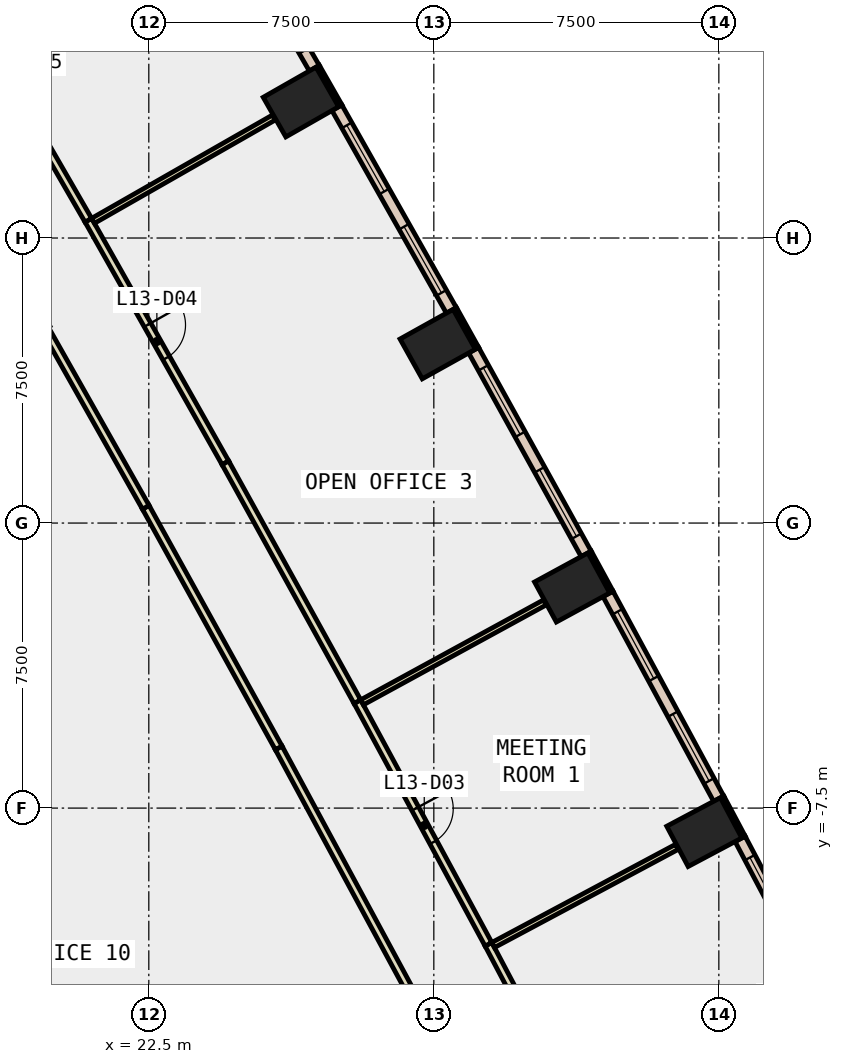
"""IFC4 building model, lengths in metres.
Left out: names, types, materials, properties, quantities, classifications, styles, units other than length and angle.
Written with IfcOpenShell. Run it as: python <this file> out.ifc"""

import sys

from ifc_helpers import new_model, si_unit, direction, frame, frame_2d, origin, origin_2d, place, context, subcontext, project, spatial, rectangle, extrude, element, fill, save


model = new_model("IFC4")
c1 = context("Model", 3, precision=1e-05, world=origin(), true_north=direction((0.0, 1.0)))
c2 = subcontext(c1, "Body", "Model", "MODEL_VIEW")
j1 = project(units=[si_unit("LENGTHUNIT", "METRE"), si_unit("PLANEANGLEUNIT", "RADIAN")], contexts=[c1])
p1 = place(None, origin())
s1 = spatial("IfcSite", under=j1, at=p1, CompositionType="ELEMENT")
p2 = place(p1, origin())
s2 = spatial("IfcBuilding", under=s1, at=p2, CompositionType="ELEMENT")
p3 = place(p2, frame((0.0, 0.0, 64.4)))
s3 = spatial("IfcBuildingStorey", under=s2, at=p3, CompositionType="ELEMENT", Elevation=64.4)
for number, where, z_axis, x_axis in (
    (1, (37.117, -8.132, -0.4), (0.0, 0.0, 1.0), (-0.469, 0.883, 0.0)),
    (2, (33.64, -1.695, -0.4), (0.0, 0.0, 1.0), (-0.478, 0.878, 0.0)),
    (3, (30.102, 4.708, -0.4), (0.0, 0.0, 1.0), (-0.487, 0.873, 0.0)),
    (4, (26.503, 11.078, -0.4), (0.0, 0.0, 1.0), (-0.496, 0.869, 0.0)),
):
    element("IfcColumn", number, at=place(p3, frame(where, z_axis=z_axis, x_axis=x_axis)), inside=s3, PredefinedType="COLUMN", context=c2, shape_type="SweptSolid", body=[
        extrude(rectangle(XDim=1.2, YDim=1.6, at=origin_2d()), origin(), (0.0, 0.0, 1.0), 4.2),
    ])
p4 = place(p3, frame((38.149, -8.263, 0.0), z_axis=(0.0, 0.0, 1.0), x_axis=(-0.469467784567, 0.882949601763, 0.0)))
e5 = element("IfcWall", 5, at=p4, inside=s3, PredefinedType="STANDARD", context=c2, shape_type="SweptSolid", body=[
    extrude(rectangle(XDim=1.199, YDim=0.1, at=frame_2d((0.6, 0.0))), origin(), (0.0, 0.0, 1.0), 3.8),
])
p5 = place(p3, frame((34.673, -1.816, 0.0), z_axis=(0.0, 0.0, 1.0), x_axis=(-0.478267644701, 0.878214131082, 0.0)))
e6 = element("IfcWall", 6, at=p5, inside=s3, PredefinedType="STANDARD", context=c2, shape_type="SweptSolid", body=[
    extrude(rectangle(XDim=1.2, YDim=0.1, at=frame_2d((0.6, 0.0))), origin(), (0.0, 0.0, 1.0), 3.8),
])
p6 = place(p3, frame((31.136, 4.598, 0.0), z_axis=(0.0, 0.0, 1.0), x_axis=(-0.486730996044, 0.87355190887, 0.0)))
e7 = element("IfcWall", 7, at=p6, inside=s3, PredefinedType="STANDARD", context=c2, shape_type="SweptSolid", body=[
    extrude(rectangle(XDim=1.2, YDim=0.1, at=frame_2d((0.6, 0.0))), origin(), (0.0, 0.0, 1.0), 3.8),
])
p7 = place(p3, frame((27.539, 10.978, 0.0), z_axis=(0.0, 0.0, 1.0), x_axis=(-0.495854054996, 0.868405870629, 0.0)))
e8 = element("IfcWall", 8, at=p7, inside=s3, PredefinedType="STANDARD", context=c2, shape_type="SweptSolid", body=[
    extrude(rectangle(XDim=1.2, YDim=0.1, at=frame_2d((0.6, 0.0))), origin(), (0.0, 0.0, 1.0), 3.8),
])
p8 = place(p3, frame((40.964, -13.81, 0.0), z_axis=(0.0, 0.0, 1.0), x_axis=(-0.467041710902, 0.884235285587, 0.0)))
e9 = element("IfcWall", 9, at=p8, inside=s3, PredefinedType="STANDARD", context=c2, shape_type="SweptSolid", body=[
    extrude(rectangle(XDim=6.22, YDim=0.3, at=frame_2d((3.11, 0.0))), origin(), (0.0, 0.0, 1.0), 3.8),
])
p9 = place(p8, frame((0.555, 0.0, 0.9)))
e10 = element("IfcOpeningElement", 10, at=p9, cuts=e9, PredefinedType="OPENING", context=c2, shape_type="SweptSolid", body=[
    extrude(rectangle(XDim=2.0, YDim=2.6, at=frame_2d((1.0, 1.3))), frame((0.0, 0.16, 0.0), z_axis=(0.0, -1.0, 0.0), x_axis=(1.0, 0.0, 0.0)), (0.0, 0.0, 1.0), 0.32),
])
p10 = place(p8, frame((3.665, 0.0, 0.9)))
e11 = element("IfcOpeningElement", 11, at=p10, cuts=e9, PredefinedType="OPENING", context=c2, shape_type="SweptSolid", body=[
    extrude(rectangle(XDim=2.0, YDim=2.6, at=frame_2d((1.0, 1.3))), frame((0.0, 0.16, 0.0), z_axis=(0.0, -1.0, 0.0), x_axis=(1.0, 0.0, 0.0)), (0.0, 0.0, 1.0), 0.32),
])
p11 = place(p3, frame((37.495, -7.253, 0.0), z_axis=(0.0, 0.0, 1.0), x_axis=(-0.475413659872, 0.879762383833, 0.0)))
e12 = element("IfcWall", 12, at=p11, inside=s3, PredefinedType="STANDARD", context=c2, shape_type="SweptSolid", body=[
    extrude(rectangle(XDim=6.125, YDim=0.3, at=frame_2d((3.063, 0.0))), origin(), (0.0, 0.0, 1.0), 3.8),
])
p12 = place(p11, frame((0.531, 0.0, 0.9)))
e13 = element("IfcOpeningElement", 13, at=p12, cuts=e12, PredefinedType="OPENING", context=c2, shape_type="SweptSolid", body=[
    extrude(rectangle(XDim=2.0, YDim=2.6, at=frame_2d((1.0, 1.3))), frame((0.0, 0.16, 0.0), z_axis=(0.0, -1.0, 0.0), x_axis=(1.0, 0.0, 0.0)), (0.0, 0.0, 1.0), 0.32),
])
p13 = place(p11, frame((3.594, 0.0, 0.9)))
e14 = element("IfcOpeningElement", 14, at=p13, cuts=e12, PredefinedType="OPENING", context=c2, shape_type="SweptSolid", body=[
    extrude(rectangle(XDim=2.0, YDim=2.6, at=frame_2d((1.0, 1.3))), frame((0.0, 0.16, 0.0), z_axis=(0.0, -1.0, 0.0), x_axis=(1.0, 0.0, 0.0)), (0.0, 0.0, 1.0), 0.32),
])
p14 = place(p3, frame((34.009, -0.812, 0.0), z_axis=(0.0, 0.0, 1.0), x_axis=(-0.483587271547, 0.875296150339, 0.0)))
e15 = element("IfcWall", 15, at=p14, inside=s3, PredefinedType="STANDARD", context=c2, shape_type="SweptSolid", body=[
    extrude(rectangle(XDim=6.125, YDim=0.3, at=frame_2d((3.062, 0.0))), origin(), (0.0, 0.0, 1.0), 3.8),
])
p15 = place(p14, frame((0.531, 0.0, 0.9)))
e16 = element("IfcOpeningElement", 16, at=p15, cuts=e15, PredefinedType="OPENING", context=c2, shape_type="SweptSolid", body=[
    extrude(rectangle(XDim=2.0, YDim=2.6, at=frame_2d((1.0, 1.3))), frame((0.0, 0.16, 0.0), z_axis=(0.0, -1.0, 0.0), x_axis=(1.0, 0.0, 0.0)), (0.0, 0.0, 1.0), 0.32),
])
p16 = place(p14, frame((3.594, 0.0, 0.9)))
e17 = element("IfcOpeningElement", 17, at=p16, cuts=e15, PredefinedType="OPENING", context=c2, shape_type="SweptSolid", body=[
    extrude(rectangle(XDim=2.0, YDim=2.6, at=frame_2d((1.0, 1.3))), frame((0.0, 0.16, 0.0), z_axis=(0.0, -1.0, 0.0), x_axis=(1.0, 0.0, 0.0)), (0.0, 0.0, 1.0), 0.32),
])
p17 = place(p3, frame((30.462, 5.595, 0.0), z_axis=(0.0, 0.0, 1.0), x_axis=(-0.491887822214, 0.870658584267, 0.0)))
e18 = element("IfcWall", 18, at=p17, inside=s3, PredefinedType="STANDARD", context=c2, shape_type="SweptSolid", body=[
    extrude(rectangle(XDim=6.125, YDim=0.3, at=frame_2d((3.062, 0.0))), origin(), (0.0, 0.0, 1.0), 3.8),
])
p18 = place(p17, frame((0.531, 0.0, 0.9)))
e19 = element("IfcOpeningElement", 19, at=p18, cuts=e18, PredefinedType="OPENING", context=c2, shape_type="SweptSolid", body=[
    extrude(rectangle(XDim=2.0, YDim=2.6, at=frame_2d((1.0, 1.3))), frame((0.0, 0.16, 0.0), z_axis=(0.0, -1.0, 0.0), x_axis=(1.0, 0.0, 0.0)), (0.0, 0.0, 1.0), 0.32),
])
p19 = place(p17, frame((3.594, 0.0, 0.9)))
e20 = element("IfcOpeningElement", 20, at=p19, cuts=e18, PredefinedType="OPENING", context=c2, shape_type="SweptSolid", body=[
    extrude(rectangle(XDim=2.0, YDim=2.6, at=frame_2d((1.0, 1.3))), frame((0.0, 0.16, 0.0), z_axis=(0.0, -1.0, 0.0), x_axis=(1.0, 0.0, 0.0)), (0.0, 0.0, 1.0), 0.32),
])
p20 = place(p3, frame((26.855, 11.968, 0.0), z_axis=(0.0, 0.0, 1.0), x_axis=(-0.499903021601, 0.86608138705, 0.0)))
e21 = element("IfcWall", 21, at=p20, inside=s3, PredefinedType="STANDARD", context=c2, shape_type="SweptSolid", body=[
    extrude(rectangle(XDim=6.125, YDim=0.3, at=frame_2d((3.062, 0.0))), origin(), (0.0, 0.0, 1.0), 3.8),
])
p21 = place(p20, frame((0.531, 0.0, 0.9)))
e22 = element("IfcOpeningElement", 22, at=p21, cuts=e21, PredefinedType="OPENING", context=c2, shape_type="SweptSolid", body=[
    extrude(rectangle(XDim=2.0, YDim=2.6, at=frame_2d((1.0, 1.3))), frame((0.0, 0.16, 0.0), z_axis=(0.0, -1.0, 0.0), x_axis=(1.0, 0.0, 0.0)), (0.0, 0.0, 1.0), 0.32),
])
p22 = place(p20, frame((3.594, 0.0, 0.9)))
e23 = element("IfcOpeningElement", 23, at=p22, cuts=e21, PredefinedType="OPENING", context=c2, shape_type="SweptSolid", body=[
    extrude(rectangle(XDim=2.0, YDim=2.6, at=frame_2d((1.0, 1.3))), frame((0.0, 0.16, 0.0), z_axis=(0.0, -1.0, 0.0), x_axis=(1.0, 0.0, 0.0)), (0.0, 0.0, 1.0), 0.32),
])
p23 = place(p3, frame((29.356, -12.281, 0.0), z_axis=(0.0, 0.0, 1.0), x_axis=(-0.475244544503, 0.87985375087, 0.0)))
e24 = element("IfcWall", 24, at=p23, inside=s3, PredefinedType="PARTITIONING", context=c2, shape_type="SweptSolid", body=[
    extrude(rectangle(XDim=7.234, YDim=0.2, at=frame_2d((3.617, 0.0))), origin(), (0.0, 0.0, 1.0), 3.8),
])
p24 = place(p3, frame((25.918, -5.916, 0.0), z_axis=(0.0, 0.0, 1.0), x_axis=(-0.483612623402, 0.875282143361, 0.0)))
e25 = element("IfcWall", 25, at=p24, inside=s3, PredefinedType="PARTITIONING", context=c2, shape_type="SweptSolid", body=[
    extrude(rectangle(XDim=7.233, YDim=0.2, at=frame_2d((3.617, 0.0))), origin(), (0.0, 0.0, 1.0), 3.8),
])
p25 = place(p3, frame((22.42, 0.415, 0.0), z_axis=(0.0, 0.0, 1.0), x_axis=(-0.491823859571, 0.870694717543, 0.0)))
e26 = element("IfcWall", 26, at=p25, inside=s3, PredefinedType="PARTITIONING", context=c2, shape_type="SweptSolid", body=[
    extrude(rectangle(XDim=5.309, YDim=0.2, at=frame_2d((2.654, 0.0))), origin(), (0.0, 0.0, 1.0), 3.8),
])
p26 = place(p3, frame((31.438, -11.083, 0.0), z_axis=(0.0, 0.0, 1.0), x_axis=(0.467077609314, -0.884216323575, 0.0)))
e27 = element("IfcWall", 27, at=p26, inside=s3, PredefinedType="PARTITIONING", context=c2, shape_type="SweptSolid", body=[
    extrude(rectangle(XDim=6.967, YDim=0.2, at=frame_2d((3.483, 0.0))), origin(), (0.0, 0.0, 1.0), 3.8),
])
p27 = place(p26, frame((2.983, 0.0, 0.0)))
e28 = element("IfcOpeningElement", 28, at=p27, cuts=e27, PredefinedType="OPENING", context=c2, shape_type="SweptSolid", body=[
    extrude(rectangle(XDim=1.0, YDim=2.1, at=frame_2d((0.5, 1.05))), frame((0.0, 0.11, 0.0), z_axis=(0.0, -1.0, 0.0), x_axis=(1.0, 0.0, 0.0)), (0.0, 0.0, 1.0), 0.22),
])
p28 = place(p3, frame((27.988, -4.699, 0.0), z_axis=(0.0, 0.0, 1.0), x_axis=(0.475319272717, -0.879813383044, 0.0)))
e29 = element("IfcWall", 29, at=p28, inside=s3, PredefinedType="PARTITIONING", context=c2, shape_type="SweptSolid", body=[
    extrude(rectangle(XDim=7.256, YDim=0.2, at=frame_2d((3.628, 0.0))), origin(), (0.0, 0.0, 1.0), 3.8),
])
p29 = place(p28, frame((3.203, 0.0, 0.0)))
e30 = element("IfcOpeningElement", 30, at=p29, cuts=e29, PredefinedType="OPENING", context=c2, shape_type="SweptSolid", body=[
    extrude(rectangle(XDim=1.0, YDim=2.1, at=frame_2d((0.5, 1.05))), frame((0.0, 0.11, 0.0), z_axis=(0.0, -1.0, 0.0), x_axis=(1.0, 0.0, 0.0)), (0.0, 0.0, 1.0), 0.22),
])
p30 = place(p3, frame((20.909, 7.969, 0.0), z_axis=(0.0, 0.0, 1.0), x_axis=(0.491808171064, -0.870703579225, 0.0)))
e31 = element("IfcWall", 31, at=p30, inside=s3, PredefinedType="PARTITIONING", context=c2, shape_type="SweptSolid", body=[
    extrude(rectangle(XDim=7.332, YDim=0.2, at=frame_2d((3.666, 0.0))), origin(), (0.0, 0.0, 1.0), 3.8),
])
p31 = place(p30, frame((3.166, 0.0, 0.0)))
e32 = element("IfcOpeningElement", 32, at=p31, cuts=e31, PredefinedType="OPENING", context=c2, shape_type="SweptSolid", body=[
    extrude(rectangle(XDim=1.0, YDim=2.1, at=frame_2d((0.5, 1.05))), frame((0.0, 0.11, 0.0), z_axis=(0.0, -1.0, 0.0), x_axis=(1.0, 0.0, 0.0)), (0.0, 0.0, 1.0), 0.22),
])
p32 = place(p3, frame((24.515, 1.585, 0.0), z_axis=(0.0, 0.0, 1.0), x_axis=(0.483629211989, -0.875272977597, 0.0)))
e33 = element("IfcWall", 33, at=p32, inside=s3, PredefinedType="PARTITIONING", context=c2, shape_type="SweptSolid", body=[
    extrude(rectangle(XDim=7.179, YDim=0.2, at=frame_2d((3.59, 0.0))), origin(), (0.0, 0.0, 1.0), 3.8),
])
p33 = place(p3, frame((17.318, 14.187, 0.0), z_axis=(0.0, 0.0, 1.0), x_axis=(0.499986381413, -0.866033266336, 0.0)))
e34 = element("IfcWall", 34, at=p33, inside=s3, PredefinedType="PARTITIONING", context=c2, shape_type="SweptSolid", body=[
    extrude(rectangle(XDim=7.18, YDim=0.2, at=frame_2d((3.59, 0.0))), origin(), (0.0, 0.0, 1.0), 3.8),
])
p34 = place(p33, frame((3.165, 0.0, 0.0)))
e35 = element("IfcOpeningElement", 35, at=p34, cuts=e34, PredefinedType="OPENING", context=c2, shape_type="SweptSolid", body=[
    extrude(rectangle(XDim=1.0, YDim=2.1, at=frame_2d((0.5, 1.05))), frame((0.0, 0.11, 0.0), z_axis=(0.0, -1.0, 0.0), x_axis=(1.0, 0.0, 0.0)), (0.0, 0.0, 1.0), 0.22),
])
p35 = place(p3, frame((31.561, -11.103, 0.0), z_axis=(0.0, 0.0, 1.0), x_axis=(0.882056805494, 0.47114306944, 0.0)))
e36 = element("IfcWall", 36, at=p35, inside=s3, PredefinedType="PARTITIONING", context=c2, shape_type="SweptSolid", body=[
    extrude(rectangle(XDim=5.48, YDim=0.15, at=frame_2d((2.74, 0.0))), origin(), (0.0, 0.0, 1.0), 3.8),
])
p36 = place(p3, frame((28.111, -4.717, 0.0), z_axis=(0.0, 0.0, 1.0), x_axis=(0.877558297547, 0.479469951515, 0.0)))
e37 = element("IfcWall", 37, at=p36, inside=s3, PredefinedType="PARTITIONING", context=c2, shape_type="SweptSolid", body=[
    extrude(rectangle(XDim=5.481, YDim=0.15, at=frame_2d((2.74, 0.0))), origin(), (0.0, 0.0, 1.0), 3.8),
])
p37 = place(p3, frame((21.033, 7.953, 0.0), z_axis=(0.0, 0.0, 1.0), x_axis=(0.868311678357, 0.496018980715, 0.0)))
e38 = element("IfcWall", 38, at=p37, inside=s3, PredefinedType="PARTITIONING", context=c2, shape_type="SweptSolid", body=[
    extrude(rectangle(XDim=5.48, YDim=0.15, at=frame_2d((2.74, 0.0))), origin(), (0.0, 0.0, 1.0), 3.8),
])
p38 = place(p10, origin())
e39 = element("IfcWindow", 39, at=p38, inside=s3, PartitioningType="SINGLE_PANEL", PredefinedType="WINDOW", context=c2, shape_type="SweptSolid", body=[
    extrude(rectangle(XDim=2.0, YDim=2.6, at=frame_2d((1.0, 1.3))), frame((0.0, 0.03, 0.0), z_axis=(0.0, -1.0, 0.0), x_axis=(1.0, 0.0, 0.0)), (0.0, 0.0, 1.0), 0.06),
])
fill(e11, e39)
p39 = place(p12, origin())
e40 = element("IfcWindow", 40, at=p39, inside=s3, PartitioningType="SINGLE_PANEL", PredefinedType="WINDOW", context=c2, shape_type="SweptSolid", body=[
    extrude(rectangle(XDim=2.0, YDim=2.6, at=frame_2d((1.0, 1.3))), frame((0.0, 0.03, 0.0), z_axis=(0.0, -1.0, 0.0), x_axis=(1.0, 0.0, 0.0)), (0.0, 0.0, 1.0), 0.06),
])
fill(e13, e40)
p40 = place(p13, origin())
e41 = element("IfcWindow", 41, at=p40, inside=s3, PartitioningType="SINGLE_PANEL", PredefinedType="WINDOW", context=c2, shape_type="SweptSolid", body=[
    extrude(rectangle(XDim=2.0, YDim=2.6, at=frame_2d((1.0, 1.3))), frame((0.0, 0.03, 0.0), z_axis=(0.0, -1.0, 0.0), x_axis=(1.0, 0.0, 0.0)), (0.0, 0.0, 1.0), 0.06),
])
fill(e14, e41)
p41 = place(p15, origin())
e42 = element("IfcWindow", 42, at=p41, inside=s3, PartitioningType="SINGLE_PANEL", PredefinedType="WINDOW", context=c2, shape_type="SweptSolid", body=[
    extrude(rectangle(XDim=2.0, YDim=2.6, at=frame_2d((1.0, 1.3))), frame((0.0, 0.03, 0.0), z_axis=(0.0, -1.0, 0.0), x_axis=(1.0, 0.0, 0.0)), (0.0, 0.0, 1.0), 0.06),
])
fill(e16, e42)
p42 = place(p16, origin())
e43 = element("IfcWindow", 43, at=p42, inside=s3, PartitioningType="SINGLE_PANEL", PredefinedType="WINDOW", context=c2, shape_type="SweptSolid", body=[
    extrude(rectangle(XDim=2.0, YDim=2.6, at=frame_2d((1.0, 1.3))), frame((0.0, 0.03, 0.0), z_axis=(0.0, -1.0, 0.0), x_axis=(1.0, 0.0, 0.0)), (0.0, 0.0, 1.0), 0.06),
])
fill(e17, e43)
p43 = place(p18, origin())
e44 = element("IfcWindow", 44, at=p43, inside=s3, PartitioningType="SINGLE_PANEL", PredefinedType="WINDOW", context=c2, shape_type="SweptSolid", body=[
    extrude(rectangle(XDim=2.0, YDim=2.6, at=frame_2d((1.0, 1.3))), frame((0.0, 0.03, 0.0), z_axis=(0.0, -1.0, 0.0), x_axis=(1.0, 0.0, 0.0)), (0.0, 0.0, 1.0), 0.06),
])
fill(e19, e44)
p44 = place(p19, origin())
e45 = element("IfcWindow", 45, at=p44, inside=s3, PartitioningType="SINGLE_PANEL", PredefinedType="WINDOW", context=c2, shape_type="SweptSolid", body=[
    extrude(rectangle(XDim=2.0, YDim=2.6, at=frame_2d((1.0, 1.3))), frame((0.0, 0.03, 0.0), z_axis=(0.0, -1.0, 0.0), x_axis=(1.0, 0.0, 0.0)), (0.0, 0.0, 1.0), 0.06),
])
fill(e20, e45)
p45 = place(p29, origin())
e46 = element("IfcDoor", 46, at=p45, inside=s3, OperationType="SINGLE_SWING_RIGHT", PredefinedType="DOOR", context=c2, shape_type="SweptSolid", body=[
    extrude(rectangle(XDim=1.0, YDim=2.1, at=frame_2d((0.5, 1.05))), frame((0.0, 0.025, 0.0), z_axis=(0.0, -1.0, 0.0), x_axis=(1.0, 0.0, 0.0)), (0.0, 0.0, 1.0), 0.05),
])
fill(e30, e46)
p46 = place(p31, origin())
e47 = element("IfcDoor", 47, at=p46, inside=s3, OperationType="SINGLE_SWING_RIGHT", PredefinedType="DOOR", context=c2, shape_type="SweptSolid", body=[
    extrude(rectangle(XDim=1.0, YDim=2.1, at=frame_2d((0.5, 1.05))), frame((0.0, 0.025, 0.0), z_axis=(0.0, -1.0, 0.0), x_axis=(1.0, 0.0, 0.0)), (0.0, 0.0, 1.0), 0.05),
])
fill(e32, e47)
save(model, sys.argv[1])
